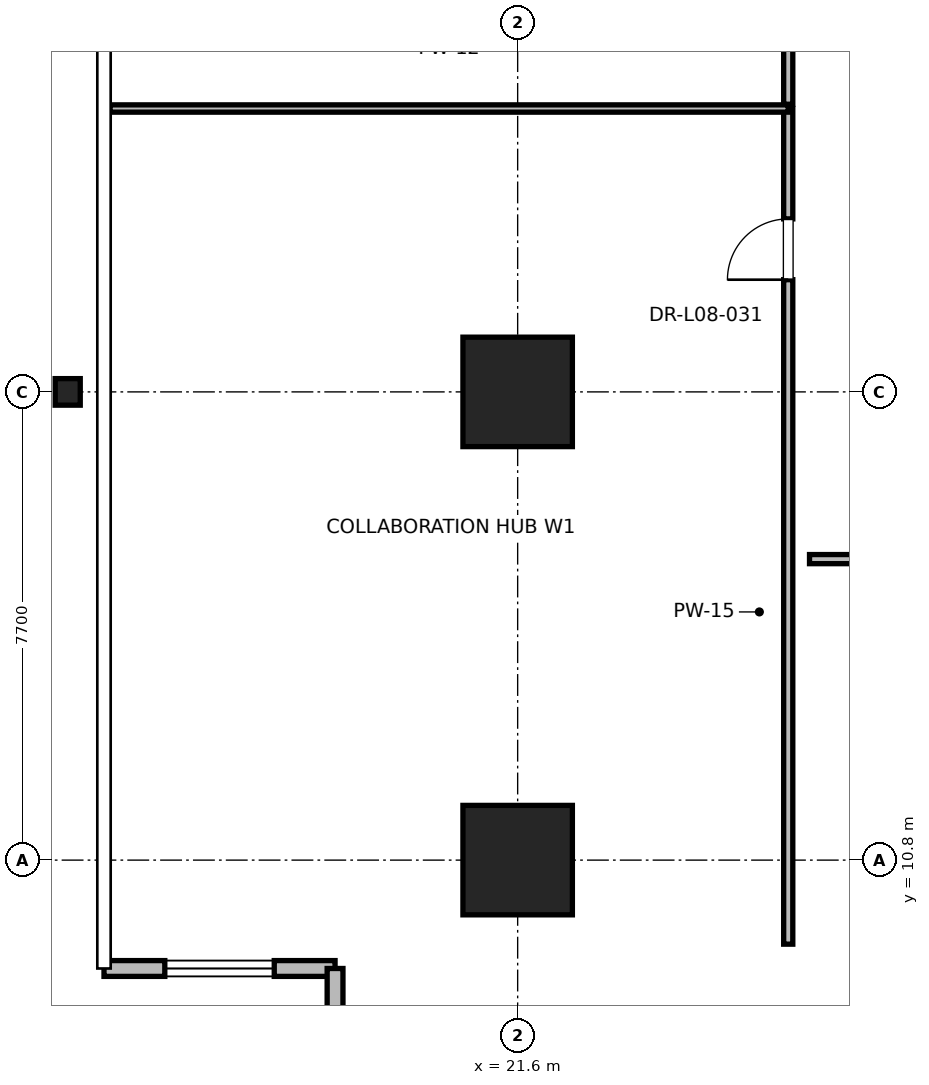
"""IFC4 building model, lengths in metres.
Left out: names, types, materials, properties, quantities, classifications, styles, units other than length and angle.
Written with IfcOpenShell. Run it as: python <this file> out.ifc"""

import sys

from ifc_helpers import new_model, si_unit, direction, frame, frame_2d, origin, origin_2d, place, context, subcontext, project, spatial, rectangle, i_section, extrude, element, fill, save


model = new_model("IFC4")
c1 = context("Model", 3, precision=1e-05, world=origin(), true_north=direction((0.0, 1.0)))
c2 = subcontext(c1, "Body", "Model", "MODEL_VIEW")
j1 = project(units=[si_unit("LENGTHUNIT", "METRE"), si_unit("PLANEANGLEUNIT", "RADIAN")], contexts=[c1])
p1 = place(None, origin())
s1 = spatial("IfcSite", under=j1, at=p1, CompositionType="ELEMENT")
p2 = place(p1, origin())
s2 = spatial("IfcBuilding", under=s1, at=p2, CompositionType="ELEMENT")
p3 = place(p2, frame((0.0, 0.0, 39.6)))
s3 = spatial("IfcBuildingStorey", under=s2, at=p3, CompositionType="ELEMENT", Elevation=39.6)
for number, where, z_axis, x_axis in (
    (1, (21.6, 18.5, 0.0), (0.0, 0.0, 1.0), (1.0, 0.0, 0.0)),
    (2, (21.6, 10.8, 0.0), (0.0, 0.0, 1.0), (1.0, 0.0, 0.0)),
):
    element("IfcColumn", number, at=place(p3, frame(where, z_axis=z_axis, x_axis=x_axis)), inside=s3, PredefinedType="COLUMN", context=c2, shape_type="SweptSolid", body=[
        extrude(rectangle(XDim=1.8, YDim=1.8, at=origin_2d()), origin(), (0.0, 0.0, 1.0), 4.0),
    ])
p4 = place(p3, frame((14.2, 18.5, 0.0), z_axis=(0.0, 0.0, 1.0), x_axis=(1.0, 0.0, 0.0)))
e3 = element("IfcColumn", 3, at=p4, inside=s3, PredefinedType="COLUMN", context=c2, shape_type="SweptSolid", body=[
    extrude(i_section(OverallWidth=0.412, OverallDepth=0.437, WebThickness=0.036, FlangeThickness=0.058, FilletRadius=0.015, at=origin_2d()), origin(), (0.0, 0.0, 1.0), 4.0),
])
p5 = place(p3, frame((14.797, 9.018, 0.0), z_axis=(0.0, 0.0, 1.0), x_axis=(1.0, 0.0, 0.0)))
e4 = element("IfcWall", 4, at=p5, inside=s3, PredefinedType="PARAPET", context=c2, shape_type="SweptSolid", body=[
    extrude(rectangle(XDim=3.8, YDim=0.26, at=frame_2d((1.9, 0.0))), origin(), (0.0, 0.0, 1.0), 3.76),
])
p6 = place(p5, frame((1.0, 0.0, 0.85)))
e5 = element("IfcOpeningElement", 5, at=p6, cuts=e4, PredefinedType="OPENING", context=c2, shape_type="SweptSolid", body=[
    extrude(rectangle(XDim=1.8, YDim=2.2, at=frame_2d((0.9, 1.1))), frame((0.0, 0.13, 0.0), z_axis=(0.0, -1.0, 0.0), x_axis=(1.0, 0.0, 0.0)), (0.0, 0.0, 1.0), 0.26),
])
p7 = place(p3, frame((18.597, 9.018, 0.0), z_axis=(0.0, 0.0, 1.0), x_axis=(0.0, -1.0, 0.0)))
e6 = element("IfcWall", 6, at=p7, inside=s3, PredefinedType="PARAPET", context=c2, shape_type="SweptSolid", body=[
    extrude(rectangle(XDim=3.4, YDim=0.26, at=frame_2d((1.7, 0.0))), origin(), (0.0, 0.0, 1.0), 3.76),
])
p8 = place(p3, frame((26.4, 15.75, 0.0), z_axis=(0.0, 0.0, 1.0), x_axis=(1.0, 0.0, 0.0)))
e7 = element("IfcWall", 7, at=p8, inside=s3, PredefinedType="PARTITIONING", context=c2, shape_type="SweptSolid", body=[
    extrude(rectangle(XDim=12.512, YDim=0.15, at=frame_2d((6.256, 0.0))), origin(), (0.0, 0.0, 1.0), 2.85),
])
p9 = place(p8, frame((5.771, 0.0, 0.0)))
e8 = element("IfcOpeningElement", 8, at=p9, cuts=e7, PredefinedType="OPENING", context=c2, shape_type="SweptSolid", body=[
    extrude(rectangle(XDim=1.0, YDim=2.15, at=frame_2d((0.5, 1.075))), frame((0.0, 0.075, 0.0), z_axis=(0.0, -1.0, 0.0), x_axis=(1.0, 0.0, 0.0)), (0.0, 0.0, 1.0), 0.15),
])
p10 = place(p3, frame((26.05, 9.418, 0.0), z_axis=(0.0, 0.0, 1.0), x_axis=(0.0, 1.0, 0.0)))
e9 = element("IfcWall", 9, at=p10, inside=s3, PredefinedType="PARTITIONING", context=c2, shape_type="SweptSolid", body=[
    extrude(rectangle(XDim=13.743, YDim=0.15, at=frame_2d((6.871, 0.0))), origin(), (0.0, 0.0, 1.0), 2.85),
])
p11 = place(p10, frame((10.927, 0.0, 0.0)))
e10 = element("IfcOpeningElement", 10, at=p11, cuts=e9, PredefinedType="OPENING", context=c2, shape_type="SweptSolid", body=[
    extrude(rectangle(XDim=1.0, YDim=2.15, at=frame_2d((0.5, 1.075))), frame((0.0, 0.075, 0.0), z_axis=(0.0, -1.0, 0.0), x_axis=(1.0, 0.0, 0.0)), (0.0, 0.0, 1.0), 0.15),
])
p12 = place(p3, frame((14.897, 23.16, 0.0), z_axis=(0.0, 0.0, 1.0), x_axis=(1.0, 0.0, 0.0)))
e11 = element("IfcWall", 11, at=p12, inside=s3, PredefinedType="PARTITIONING", context=c2, shape_type="SweptSolid", body=[
    extrude(rectangle(XDim=11.153, YDim=0.12, at=frame_2d((5.577, 0.0))), origin(), (0.0, 0.0, 1.0), 2.85),
])
p13 = place(p3, frame((26.05, 23.23, 0.0), z_axis=(0.0, 0.0, 1.0), x_axis=(0.0, 1.0, 0.0)))
e12 = element("IfcWall", 12, at=p13, inside=s3, PredefinedType="PARTITIONING", context=c2, shape_type="SweptSolid", body=[
    extrude(rectangle(XDim=22.352, YDim=0.15, at=frame_2d((11.176, 0.0))), origin(), (0.0, 0.0, 1.0), 2.85),
])
p14 = place(p13, frame((6.085, 0.0, 0.0)))
e13 = element("IfcOpeningElement", 13, at=p14, cuts=e12, PredefinedType="OPENING", context=c2, shape_type="SweptSolid", body=[
    extrude(rectangle(XDim=1.0, YDim=2.15, at=frame_2d((0.5, 1.075))), frame((0.0, 0.075, 0.0), z_axis=(0.0, -1.0, 0.0), x_axis=(1.0, 0.0, 0.0)), (0.0, 0.0, 1.0), 0.15),
])
p15 = place(p6, origin())
e14 = element("IfcWindow", 14, at=p15, inside=s3, PartitioningType="SINGLE_PANEL", PredefinedType="WINDOW", context=c2, shape_type="SweptSolid", body=[
    extrude(rectangle(XDim=1.8, YDim=2.2, at=frame_2d((0.9, 1.1))), frame((0.0, 0.03, 0.0), z_axis=(0.0, -1.0, 0.0), x_axis=(1.0, 0.0, 0.0)), (0.0, 0.0, 1.0), 0.06),
])
fill(e5, e14)
p16 = place(p11, origin())
e15 = element("IfcDoor", 15, at=p16, inside=s3, OperationType="SINGLE_SWING_LEFT", PredefinedType="DOOR", context=c2, shape_type="SweptSolid", body=[
    extrude(rectangle(XDim=1.0, YDim=2.15, at=frame_2d((0.5, 1.075))), frame((0.0, 0.025, 0.0), z_axis=(0.0, -1.0, 0.0), x_axis=(1.0, 0.0, 0.0)), (0.0, 0.0, 1.0), 0.05),
])
fill(e10, e15)
save(model, sys.argv[1])
